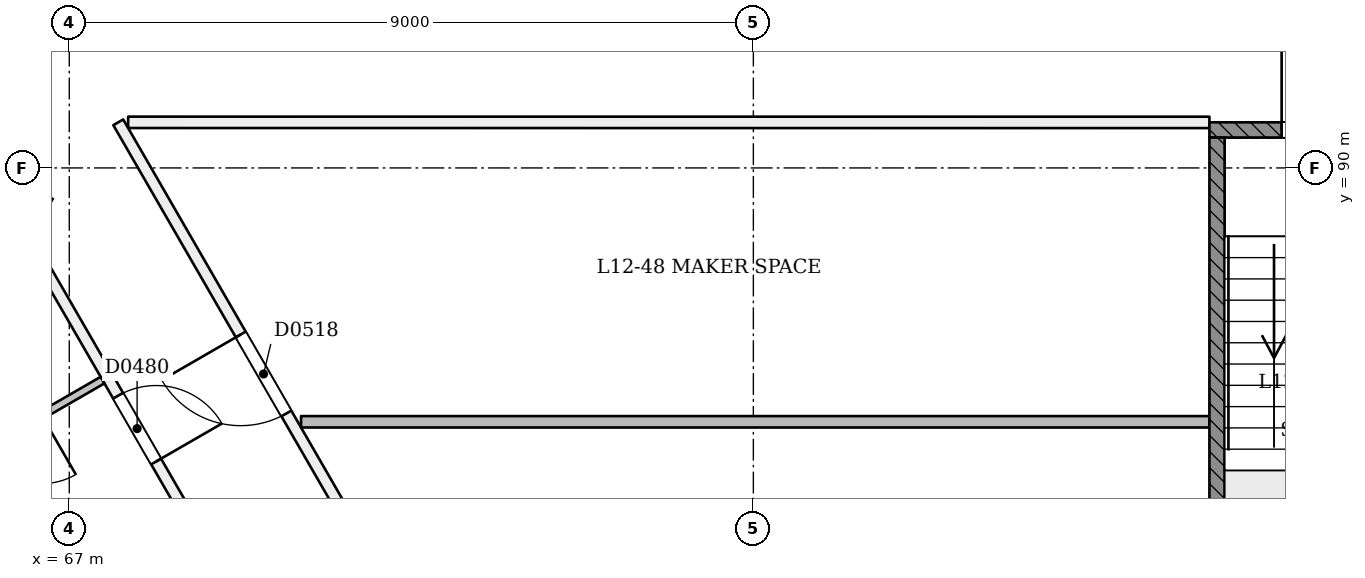
"""IFC4 building model, lengths in metres.
Left out: names, types, materials, properties, quantities, classifications, styles, units other than length and angle.
Written with IfcOpenShell. Run it as: python <this file> out.ifc"""

import sys

from ifc_helpers import new_model, si_unit, direction, frame, frame_2d, origin, origin_2d, place, context, subcontext, project, spatial, rectangle, extrude, element, fill, save


model = new_model("IFC4")
c1 = context("Model", 3, precision=1e-05, world=origin(), true_north=direction((0.0, 1.0)))
c2 = subcontext(c1, "Body", "Model", "MODEL_VIEW")
j1 = project(units=[si_unit("LENGTHUNIT", "METRE"), si_unit("PLANEANGLEUNIT", "RADIAN")], contexts=[c1])
p1 = place(None, origin())
s1 = spatial("IfcSite", under=j1, at=p1, CompositionType="ELEMENT")
p2 = place(p1, origin())
s2 = spatial("IfcBuilding", under=s1, at=p2, CompositionType="ELEMENT")
p3 = place(p2, frame((0.0, 0.0, 52.2)))
s3 = spatial("IfcBuildingStorey", under=s2, at=p3, CompositionType="ELEMENT", Elevation=52.2)
p4 = place(p3, frame((66.252, 89.41, -0.021), z_axis=(0.02215369191, 0.038413282303, 0.999016333038), x_axis=(-0.865357758702, -0.499681054678, 0.038403034389)))
e1 = element("IfcColumn", 1, at=p4, inside=s3, PredefinedType="COLUMN", context=c2, shape_type="SweptSolid", body=[
    extrude(rectangle(XDim=0.7, YDim=0.7, at=origin_2d()), origin(), (0.0, 0.0, 1.0), 3.604),
])
p5 = place(p3, frame((64.002, 93.308, 0.0), z_axis=(0.0, 0.0, 1.0), x_axis=(0.49999948646, -0.866025700277, 0.0)))
e2 = element("IfcWall", 2, at=p5, inside=s3, PredefinedType="PARTITIONING", context=c2, shape_type="SweptSolid", body=[
    extrude(rectangle(XDim=38.6, YDim=0.15, at=frame_2d((19.3, 0.0))), origin(), (0.0, 0.0, 1.0), 2.7),
])
p6 = place(p5, frame((0.605, 0.0, 0.0)))
e3 = element("IfcOpeningElement", 3, at=p6, cuts=e2, PredefinedType="OPENING", context=c2, shape_type="SweptSolid", body=[
    extrude(rectangle(XDim=1.0, YDim=2.1, at=frame_2d((0.5, 1.05))), frame((0.0, 0.085, 0.0), z_axis=(0.0, -1.0, 0.0), x_axis=(1.0, 0.0, 0.0)), (0.0, 0.0, 1.0), 0.171),
])
p7 = place(p5, frame((7.28, 0.0, 0.0)))
e4 = element("IfcOpeningElement", 4, at=p7, cuts=e2, PredefinedType="OPENING", context=c2, shape_type="SweptSolid", body=[
    extrude(rectangle(XDim=1.0, YDim=2.1, at=frame_2d((0.5, 1.05))), frame((0.0, 0.085, 0.0), z_axis=(0.0, -1.0, 0.0), x_axis=(1.0, 0.0, 0.0)), (0.0, 0.0, 1.0), 0.171),
])
p8 = place(p5, frame((9.72, 0.0, 0.0)))
e5 = element("IfcOpeningElement", 5, at=p8, cuts=e2, PredefinedType="OPENING", context=c2, shape_type="SweptSolid", body=[
    extrude(rectangle(XDim=1.0, YDim=2.1, at=frame_2d((0.5, 1.05))), frame((0.0, 0.085, 0.0), z_axis=(0.0, -1.0, 0.0), x_axis=(1.0, 0.0, 0.0)), (0.0, 0.0, 1.0), 0.171),
])
p9 = place(p5, frame((16.395, 0.0, 0.0)))
e6 = element("IfcOpeningElement", 6, at=p9, cuts=e2, PredefinedType="OPENING", context=c2, shape_type="SweptSolid", body=[
    extrude(rectangle(XDim=1.0, YDim=2.1, at=frame_2d((0.5, 1.05))), frame((0.0, 0.085, 0.0), z_axis=(0.0, -1.0, 0.0), x_axis=(1.0, 0.0, 0.0)), (0.0, 0.0, 1.0), 0.171),
])
p10 = place(p5, frame((18.72, 0.0, 0.0)))
e7 = element("IfcOpeningElement", 7, at=p10, cuts=e2, PredefinedType="OPENING", context=c2, shape_type="SweptSolid", body=[
    extrude(rectangle(XDim=1.0, YDim=2.1, at=frame_2d((0.5, 1.05))), frame((0.0, 0.085, 0.0), z_axis=(0.0, -1.0, 0.0), x_axis=(1.0, 0.0, 0.0)), (0.0, 0.0, 1.0), 0.171),
])
p11 = place(p5, frame((25.395, 0.0, 0.0)))
e8 = element("IfcOpeningElement", 8, at=p11, cuts=e2, PredefinedType="OPENING", context=c2, shape_type="SweptSolid", body=[
    extrude(rectangle(XDim=1.0, YDim=2.1, at=frame_2d((0.5, 1.05))), frame((0.0, 0.085, 0.0), z_axis=(0.0, -1.0, 0.0), x_axis=(1.0, 0.0, 0.0)), (0.0, 0.0, 1.0), 0.171),
])
p12 = place(p5, frame((27.605, 0.0, 0.0)))
e9 = element("IfcOpeningElement", 9, at=p12, cuts=e2, PredefinedType="OPENING", context=c2, shape_type="SweptSolid", body=[
    extrude(rectangle(XDim=1.0, YDim=2.1, at=frame_2d((0.5, 1.05))), frame((0.0, 0.085, 0.0), z_axis=(0.0, -1.0, 0.0), x_axis=(1.0, 0.0, 0.0)), (0.0, 0.0, 1.0), 0.171),
])
p13 = place(p5, frame((34.28, 0.0, 0.0)))
e10 = element("IfcOpeningElement", 10, at=p13, cuts=e2, PredefinedType="OPENING", context=c2, shape_type="SweptSolid", body=[
    extrude(rectangle(XDim=1.0, YDim=2.1, at=frame_2d((0.5, 1.05))), frame((0.0, 0.085, 0.0), z_axis=(0.0, -1.0, 0.0), x_axis=(1.0, 0.0, 0.0)), (0.0, 0.0, 1.0), 0.171),
])
p14 = place(p5, frame((37.324, 0.0, 0.0)))
e11 = element("IfcOpeningElement", 11, at=p14, cuts=e2, PredefinedType="OPENING", context=c2, shape_type="SweptSolid", body=[
    extrude(rectangle(XDim=1.0, YDim=2.1, at=frame_2d((0.5, 1.05))), frame((0.0, 0.085, 0.0), z_axis=(0.0, -1.0, 0.0), x_axis=(1.0, 0.0, 0.0)), (0.0, 0.0, 1.0), 0.171),
])
p15 = place(p3, frame((85.0, 60.54, 0.0), z_axis=(0.0, 0.0, 1.0), x_axis=(-0.500000084694, 0.866025354886, 0.0)))
e12 = element("IfcWall", 12, at=p15, inside=s3, PredefinedType="PARTITIONING", context=c2, shape_type="SweptSolid", body=[
    extrude(rectangle(XDim=34.711, YDim=0.15, at=frame_2d((17.355, 0.0))), origin(), (0.0, 0.0, 1.0), 3.1),
])
p16 = place(p15, frame((5.966, 0.0, 0.0)))
e13 = element("IfcOpeningElement", 13, at=p16, cuts=e12, PredefinedType="OPENING", context=c2, shape_type="SweptSolid", body=[
    extrude(rectangle(XDim=1.2, YDim=2.1, at=frame_2d((0.6, 1.05))), frame((0.0, 0.085, 0.0), z_axis=(0.0, -1.0, 0.0), x_axis=(1.0, 0.0, 0.0)), (0.0, 0.0, 1.0), 0.171),
])
p17 = place(p15, frame((11.813, 0.0, 0.0)))
e14 = element("IfcOpeningElement", 14, at=p17, cuts=e12, PredefinedType="OPENING", context=c2, shape_type="SweptSolid", body=[
    extrude(rectangle(XDim=1.2, YDim=2.1, at=frame_2d((0.6, 1.05))), frame((0.0, 0.085, 0.0), z_axis=(0.0, -1.0, 0.0), x_axis=(1.0, 0.0, 0.0)), (0.0, 0.0, 1.0), 0.171),
])
p18 = place(p15, frame((25.156, 0.0, 0.0)))
e15 = element("IfcOpeningElement", 15, at=p18, cuts=e12, PredefinedType="OPENING", context=c2, shape_type="SweptSolid", body=[
    extrude(rectangle(XDim=1.2, YDim=2.1, at=frame_2d((0.6, 1.05))), frame((0.0, 0.085, 0.0), z_axis=(0.0, -1.0, 0.0), x_axis=(1.0, 0.0, 0.0)), (0.0, 0.0, 1.0), 0.171),
])
p19 = place(p15, frame((30.288, 0.0, 0.0)))
e16 = element("IfcOpeningElement", 16, at=p19, cuts=e12, PredefinedType="OPENING", context=c2, shape_type="SweptSolid", body=[
    extrude(rectangle(XDim=1.2, YDim=2.1, at=frame_2d((0.6, 1.05))), frame((0.0, 0.085, 0.0), z_axis=(0.0, -1.0, 0.0), x_axis=(1.0, 0.0, 0.0)), (0.0, 0.0, 1.0), 0.171),
])
p20 = place(p15, frame((15.887, 0.0, 0.0)))
e17 = element("IfcOpeningElement", 17, at=p20, cuts=e12, PredefinedType="OPENING", context=c2, shape_type="SweptSolid", body=[
    extrude(rectangle(XDim=1.2, YDim=2.1, at=frame_2d((0.6, 1.05))), frame((0.0, 0.085, 0.0), z_axis=(0.0, -1.0, 0.0), x_axis=(1.0, 0.0, 0.0)), (0.0, 0.0, 1.0), 0.171),
])
p21 = place(p15, frame((19.777, 0.0, 0.0)))
e18 = element("IfcOpeningElement", 18, at=p21, cuts=e12, PredefinedType="OPENING", context=c2, shape_type="SweptSolid", body=[
    extrude(rectangle(XDim=1.2, YDim=2.1, at=frame_2d((0.6, 1.05))), frame((0.0, 0.085, 0.0), z_axis=(0.0, -1.0, 0.0), x_axis=(1.0, 0.0, 0.0)), (0.0, 0.0, 1.0), 0.171),
])
p22 = place(p3, frame((67.775, 90.6, 0.0), z_axis=(0.0, 0.0, 1.0), x_axis=(0.999999997644, -6.8649493e-05, 0.0)))
e19 = element("IfcWall", 19, at=p22, inside=s3, PredefinedType="PARTITIONING", context=c2, shape_type="SweptSolid", body=[
    extrude(rectangle(XDim=14.225, YDim=0.15, at=frame_2d((7.113, 0.0))), origin(), (0.0, 0.0, 1.0), 3.1),
])
p23 = place(p3, frame((67.438, 87.208, 0.0), z_axis=(0.0, 0.0, 1.0), x_axis=(-0.866048868473, -0.499959355765, 0.0)))
e20 = element("IfcWall", 20, at=p23, inside=s3, PredefinedType="PARTITIONING", context=c2, shape_type="SweptSolid", body=[
    extrude(rectangle(XDim=2.825, YDim=0.1, at=frame_2d((1.413, 0.0))), origin(), (0.0, 0.0, 1.0), 3.1),
])
p24 = place(p23, frame((0.925, 0.0, 0.0)))
e21 = element("IfcOpeningElement", 21, at=p24, cuts=e20, PredefinedType="OPENING", context=c2, shape_type="SweptSolid", body=[
    extrude(rectangle(XDim=0.9, YDim=2.1, at=frame_2d((0.45, 1.05))), frame((0.0, 0.061, 0.0), z_axis=(0.0, -1.0, 0.0), x_axis=(1.0, 0.0, 0.0)), (0.0, 0.0, 1.0), 0.121),
])
p25 = place(p3, frame((82.0, 86.66, 0.0), z_axis=(0.0, 0.0, 1.0), x_axis=(-1.0, 0.0, 0.0)))
e22 = element("IfcWall", 22, at=p25, inside=s3, PredefinedType="PARTITIONING", context=c2, shape_type="SweptSolid", body=[
    extrude(rectangle(XDim=11.951, YDim=0.15, at=frame_2d((5.976, 0.0))), origin(), (0.0, 0.0, 1.0), 3.1),
])
p26 = place(p3, frame((82.0, 90.5, 0.0), z_axis=(0.0, 0.0, 1.0), x_axis=(1.0, 0.0, 0.0)))
e23 = element("IfcWall", 23, at=p26, inside=s3, PredefinedType="SOLIDWALL", context=c2, shape_type="SweptSolid", body=[
    extrude(rectangle(XDim=6.0, YDim=0.2, at=frame_2d((3.0, 0.0))), origin(), (0.0, 0.0, 1.0), 3.1),
])
p27 = place(p26, frame((0.95, 0.0, 0.0)))
e24 = element("IfcOpeningElement", 24, at=p27, cuts=e23, PredefinedType="OPENING", context=c2, shape_type="SweptSolid", body=[
    extrude(rectangle(XDim=1.2, YDim=2.1, at=frame_2d((0.6, 1.05))), frame((0.0, 0.11, 0.0), z_axis=(0.0, -1.0, 0.0), x_axis=(1.0, 0.0, 0.0)), (0.0, 0.0, 1.0), 0.221),
])
p28 = place(p26, frame((3.85, 0.0, 0.0)))
e25 = element("IfcOpeningElement", 25, at=p28, cuts=e23, PredefinedType="OPENING", context=c2, shape_type="SweptSolid", body=[
    extrude(rectangle(XDim=1.2, YDim=2.1, at=frame_2d((0.6, 1.05))), frame((0.0, 0.11, 0.0), z_axis=(0.0, -1.0, 0.0), x_axis=(1.0, 0.0, 0.0)), (0.0, 0.0, 1.0), 0.221),
])
p29 = place(p3, frame((82.1, 83.6, 0.0), z_axis=(0.0, 0.0, 1.0), x_axis=(0.0, 1.0, 0.0)))
e26 = element("IfcWall", 26, at=p29, inside=s3, PredefinedType="SOLIDWALL", context=c2, shape_type="SweptSolid", body=[
    extrude(rectangle(XDim=6.8, YDim=0.2, at=frame_2d((3.4, 0.0))), origin(), (0.0, 0.0, 1.0), 3.1),
])
p30 = place(p7, origin())
e27 = element("IfcDoor", 27, at=p30, inside=s3, OperationType="SINGLE_SWING_RIGHT", PredefinedType="NOTDEFINED", context=c2, shape_type="SweptSolid", body=[
    extrude(rectangle(XDim=1.0, YDim=2.1, at=frame_2d((0.5, 1.05))), frame((0.0, 0.025, 0.0), z_axis=(0.0, -1.0, 0.0), x_axis=(1.0, 0.0, 0.0)), (0.0, 0.0, 1.0), 0.05),
])
fill(e4, e27)
p31 = place(p19, origin())
e28 = element("IfcDoor", 28, at=p31, inside=s3, OperationType="SINGLE_SWING_RIGHT", PredefinedType="NOTDEFINED", context=c2, shape_type="SweptSolid", body=[
    extrude(rectangle(XDim=1.2, YDim=2.1, at=frame_2d((0.6, 1.05))), frame((0.0, 0.025, 0.0), z_axis=(0.0, -1.0, 0.0), x_axis=(1.0, 0.0, 0.0)), (0.0, 0.0, 1.0), 0.05),
])
fill(e16, e28)
p32 = place(p27, origin())
e29 = element("IfcDoor", 29, at=p32, inside=s3, OperationType="SINGLE_SWING_LEFT", PredefinedType="NOTDEFINED", context=c2, shape_type="SweptSolid", body=[
    extrude(rectangle(XDim=1.2, YDim=2.1, at=frame_2d((0.6, 1.05))), frame((0.0, 0.025, 0.0), z_axis=(0.0, -1.0, 0.0), x_axis=(1.0, 0.0, 0.0)), (0.0, 0.0, 1.0), 0.05),
])
fill(e24, e29)
save(model, sys.argv[1])
